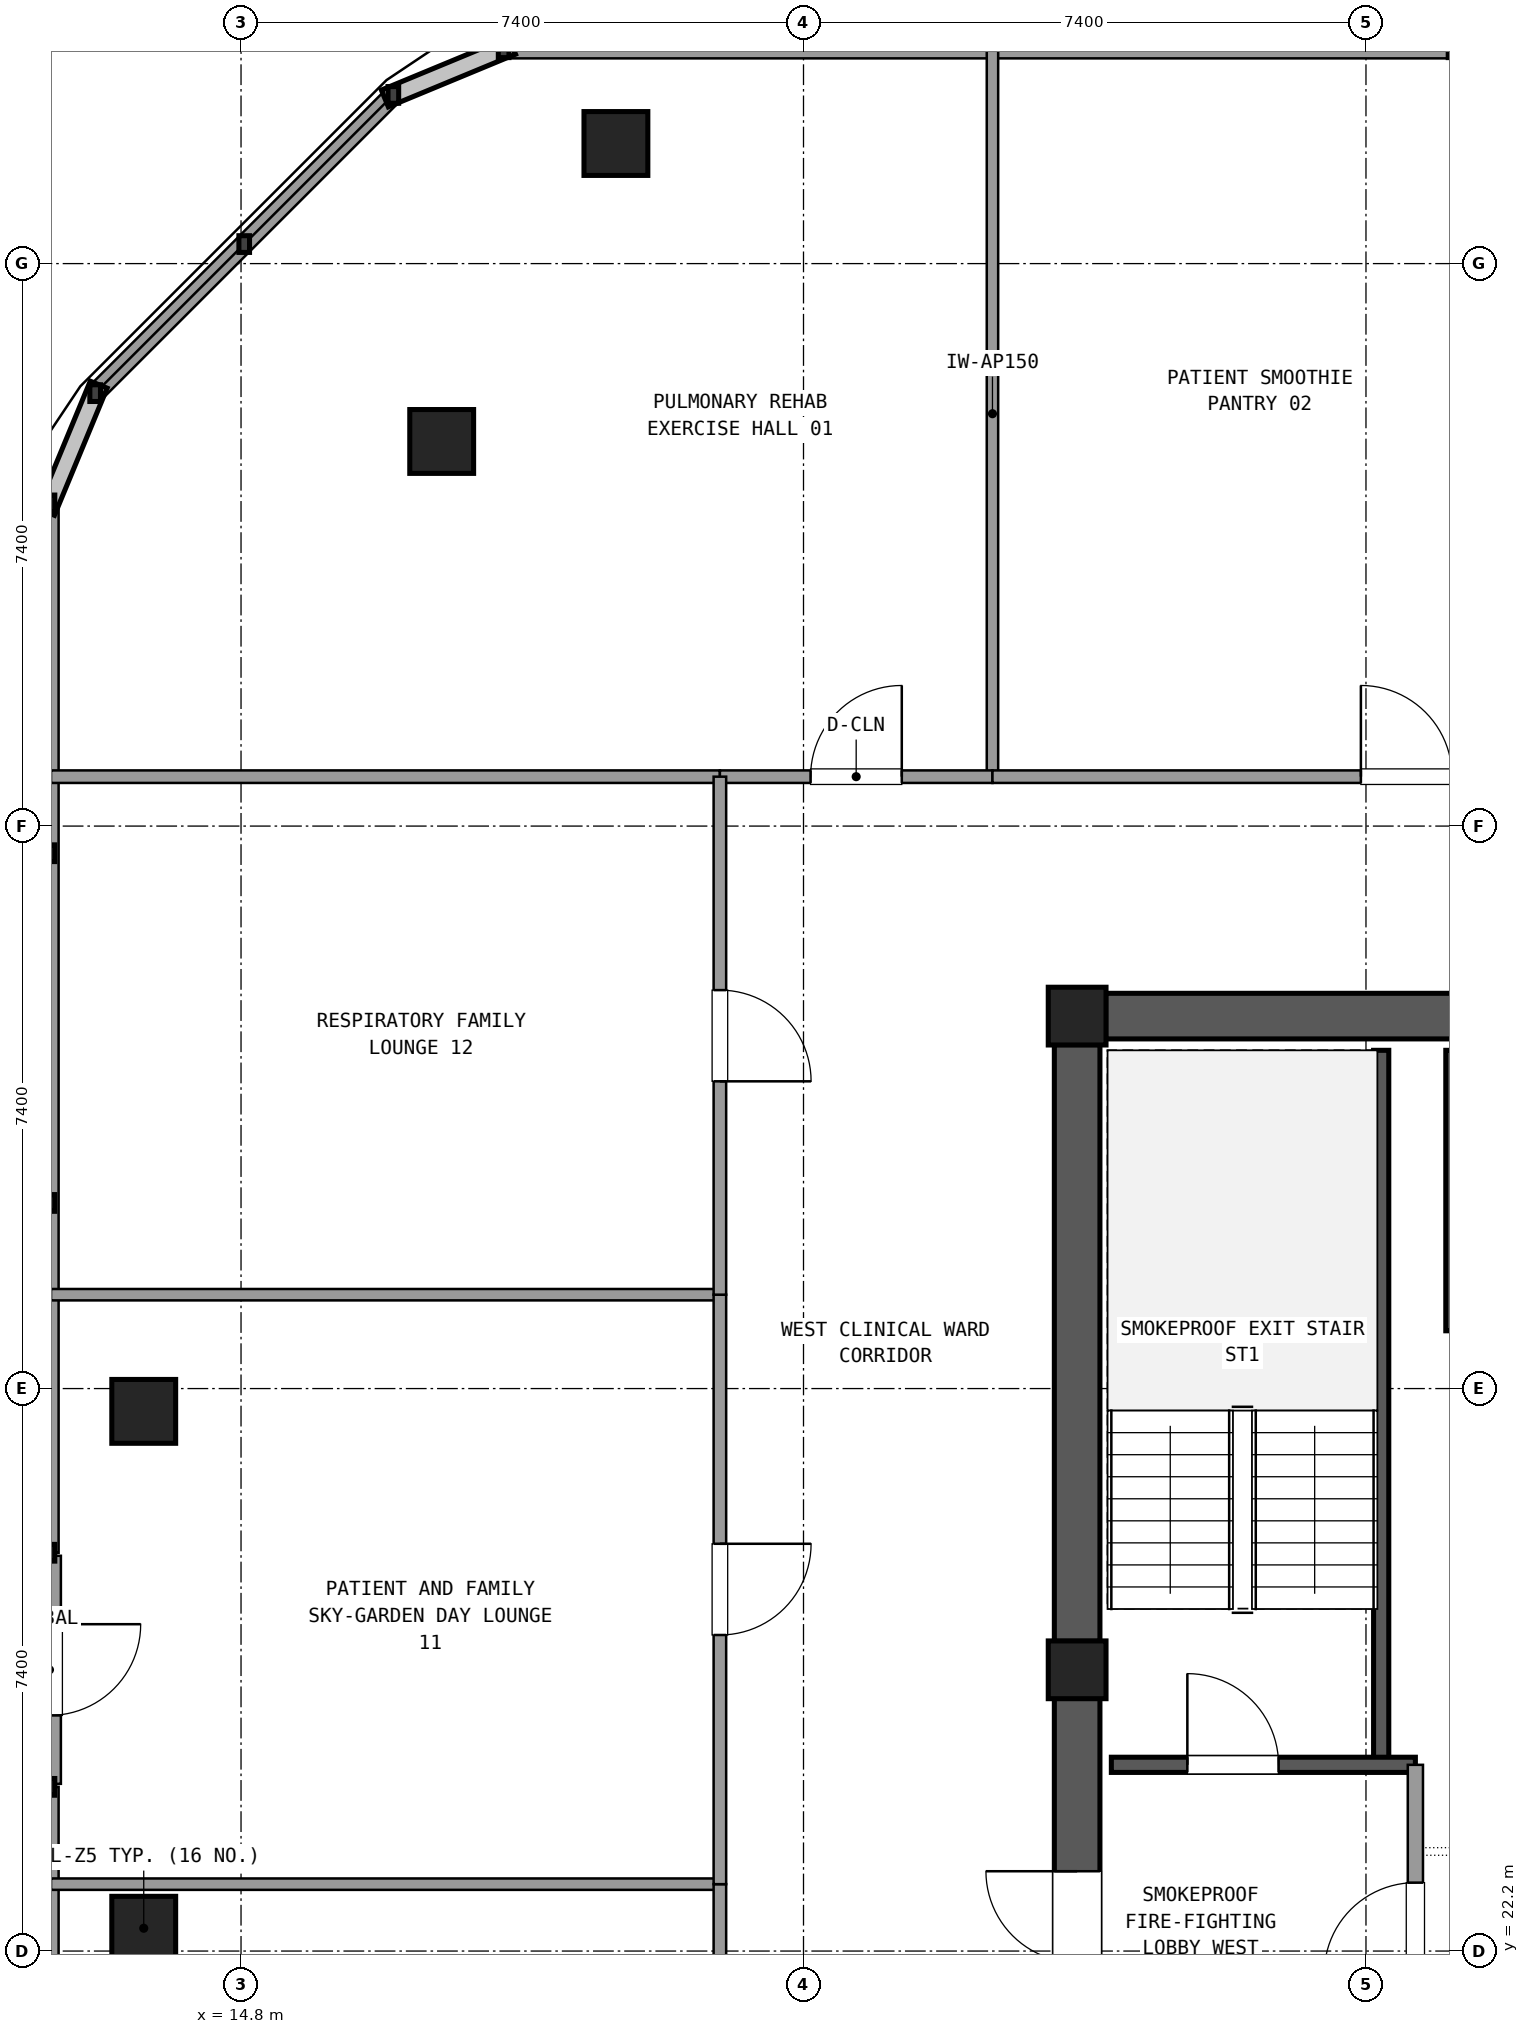
"""IFC4 building model, lengths in metres.
Left out: names, types, materials, properties, quantities, classifications, styles, units other than length and angle.
Written with IfcOpenShell. Run it as: python <this file> out.ifc"""

import sys

from ifc_helpers import new_model, si_unit, direction, frame, frame_2d, origin, origin_2d, place, context, subcontext, project, spatial, rectangle, extrude, element, fill, save


model = new_model("IFC4")
c1 = context("Model", 3, precision=1e-05, world=origin(), true_north=direction((0.0, 1.0)))
c2 = subcontext(c1, "Body", "Model", "MODEL_VIEW")
j1 = project(units=[si_unit("LENGTHUNIT", "METRE"), si_unit("PLANEANGLEUNIT", "RADIAN")], contexts=[c1])
p1 = place(None, origin())
s1 = spatial("IfcSite", under=j1, at=p1, CompositionType="ELEMENT")
p2 = place(p1, origin())
s2 = spatial("IfcBuilding", under=s1, at=p2, CompositionType="ELEMENT")
p3 = place(p2, frame((0.0, 0.0, 271.62)))
s3 = spatial("IfcBuildingStorey", under=s2, at=p3, CompositionType="ELEMENT", Elevation=271.62)
for number, where, z_axis, x_axis in (
    (1, (25.8, 34.5, 0.0), (0.0, 0.0, 1.0), (1.0, 0.0, 0.0)),
    (2, (25.8, 25.9, 0.0), (0.0, 0.0, 1.0), (1.0, 0.0, 0.0)),
):
    element("IfcColumn", number, at=place(p3, frame(where, z_axis=z_axis, x_axis=x_axis)), inside=s3, PredefinedType="COLUMN", context=c2, shape_type="SweptSolid", body=[
        extrude(rectangle(XDim=0.76, YDim=0.76, at=origin_2d()), origin(), (0.0, 0.0, 1.0), 3.6),
    ])
p4 = place(p3, frame((36.625, 34.5, 0.0), z_axis=(0.0, 0.0, 1.0), x_axis=(-1.0, 0.0, 0.0)))
e3 = element("IfcWall", 3, at=p4, inside=s3, PredefinedType="SHEAR", context=c2, shape_type="SweptSolid", body=[
    extrude(rectangle(XDim=10.45, YDim=0.6, at=frame_2d((5.225, 0.0))), origin(), (0.0, 0.0, 1.0), 3.32),
])
p5 = place(p4, frame((4.225, 0.0, 0.0)))
e4 = element("IfcOpeningElement", 4, at=p5, cuts=e3, PredefinedType="OPENING", context=c2, shape_type="SweptSolid", body=[
    extrude(rectangle(XDim=1.2, YDim=2.15, at=frame_2d((0.6, 1.075))), frame((0.0, 0.31, 0.0), z_axis=(0.0, -1.0, 0.0), x_axis=(1.0, 0.0, 0.0)), (0.0, 0.0, 1.0), 0.62),
])
p6 = place(p3, frame((25.8, 34.125, 0.0), z_axis=(0.0, 0.0, 1.0), x_axis=(0.0, -1.0, 0.0)))
e5 = element("IfcWall", 5, at=p6, inside=s3, PredefinedType="SHEAR", context=c2, shape_type="SweptSolid", body=[
    extrude(rectangle(XDim=7.85, YDim=0.6, at=frame_2d((3.925, 0.0))), origin(), (0.0, 0.0, 1.0), 3.32),
])
p7 = place(p3, frame((25.8, 25.525, 0.0), z_axis=(0.0, 0.0, 1.0), x_axis=(0.0, -1.0, 0.0)))
e6 = element("IfcWall", 6, at=p7, inside=s3, PredefinedType="SHEAR", context=c2, shape_type="SweptSolid", body=[
    extrude(rectangle(XDim=7.85, YDim=0.6, at=frame_2d((3.925, 0.0))), origin(), (0.0, 0.0, 1.0), 3.32),
])
p8 = place(p7, frame((2.275, 0.0, 0.0)))
e7 = element("IfcOpeningElement", 7, at=p8, cuts=e6, PredefinedType="OPENING", context=c2, shape_type="SweptSolid", body=[
    extrude(rectangle(XDim=1.2, YDim=2.15, at=frame_2d((0.6, 1.075))), frame((0.0, 0.31, 0.0), z_axis=(0.0, -1.0, 0.0), x_axis=(1.0, 0.0, 0.0)), (0.0, 0.0, 1.0), 0.62),
])
for number, where, z_axis, x_axis in (
    (8, (13.52, 22.5, 0.0), (0.0, 0.0, 1.0), (1.0, 0.0, 0.0)),
    (9, (19.732, 45.98, 0.0), (0.0, 0.0, 1.0), (1.0, 0.0, 0.0)),
    (10, (17.44, 42.06, 0.0), (0.0, 0.0, 1.0), (1.0, 0.0, 0.0)),
    (11, (13.52, 29.3, 0.0), (0.0, 0.0, 1.0), (1.0, 0.0, 0.0)),
):
    element("IfcColumn", number, at=place(p3, frame(where, z_axis=z_axis, x_axis=x_axis)), inside=s3, PredefinedType="COLUMN", context=c2, shape_type="SweptSolid", body=[
        extrude(rectangle(XDim=0.84, YDim=0.84, at=origin_2d()), origin(), (0.0, 0.0, 1.0), 3.6),
    ])
p9 = place(p3, frame((55.745, 47.22, 0.0), z_axis=(0.0, 0.0, 1.0), x_axis=(-1.0, 0.0, 0.0)))
e12 = element("IfcWall", 12, at=p9, inside=s3, PredefinedType="SOLIDWALL", context=c2, shape_type="SweptSolid", body=[
    extrude(rectangle(XDim=37.49, YDim=0.24, at=frame_2d((18.745, 0.0))), origin(), (0.0, 0.0, 1.0), 0.85),
])
p10 = place(p3, frame((16.804, 46.619, 0.0), z_axis=(0.0, 0.0, 1.0), x_axis=(-0.707106781187, -0.707106781187, 0.0)))
e13 = element("IfcWall", 13, at=p10, inside=s3, PredefinedType="SOLIDWALL", context=c2, shape_type="SweptSolid", body=[
    extrude(rectangle(XDim=5.548, YDim=0.24, at=frame_2d((2.774, 0.0))), origin(), (0.0, 0.0, 1.0), 0.85),
])
p11 = place(p3, frame((12.28, 27.4, 0.0), z_axis=(0.0, 0.0, 1.0), x_axis=(0.0, -1.0, 0.0)))
e14 = element("IfcWall", 14, at=p11, inside=s3, PredefinedType="SOLIDWALL", context=c2, shape_type="SweptSolid", body=[
    extrude(rectangle(XDim=3.0, YDim=0.3, at=frame_2d((1.5, 0.0))), origin(), (0.0, 0.0, 1.0), 2.69),
])
p12 = place(p11, frame((0.9, 0.0, 0.0)))
e15 = element("IfcOpeningElement", 15, at=p12, cuts=e14, PredefinedType="OPENING", context=c2, shape_type="SweptSolid", body=[
    extrude(rectangle(XDim=1.2, YDim=2.2, at=frame_2d((0.6, 1.1))), frame((0.0, 0.16, 0.0), z_axis=(0.0, -1.0, 0.0), x_axis=(1.0, 0.0, 0.0)), (0.0, 0.0, 1.0), 0.32),
])
for number, where, z_axis, x_axis in (
    (16, (12.28, 41.245, 0.0), (0.0, 0.0, 1.0), (0.0, -1.0, 0.0)),
    (17, (12.28, 24.36, 0.0), (0.0, 0.0, 1.0), (0.0, -1.0, 0.0)),
):
    element("IfcWall", number, at=place(p3, frame(where, z_axis=z_axis, x_axis=x_axis)), inside=s3, PredefinedType="SOLIDWALL", context=c2, shape_type="SweptSolid", body=[
        extrude(rectangle(XDim=13.805, YDim=0.24, at=frame_2d((6.903, 0.0))), origin(), (0.0, 0.0, 1.0), 0.85),
    ])
p13 = place(p3, frame((29.8, 24.65, 0.0), z_axis=(0.0, 0.0, 1.0), x_axis=(0.0, 1.0, 0.0)))
e18 = element("IfcWall", 18, at=p13, inside=s3, PredefinedType="SHEAR", context=c2, shape_type="SweptSolid", body=[
    extrude(rectangle(XDim=9.4, YDim=0.2, at=frame_2d((4.7, 0.0))), origin(), (0.0, 0.0, 1.0), 3.32),
])
p14 = place(p3, frame((26.25, 24.65, 0.0), z_axis=(0.0, 0.0, 1.0), x_axis=(1.0, 0.0, 0.0)))
e19 = element("IfcWall", 19, at=p14, inside=s3, PredefinedType="SHEAR", context=c2, shape_type="SweptSolid", body=[
    extrude(rectangle(XDim=4.0, YDim=0.2, at=frame_2d((2.0, 0.0))), origin(), (0.0, 0.0, 1.0), 3.32),
])
p15 = place(p14, frame((1.0, 0.0, 0.0)))
e20 = element("IfcOpeningElement", 20, at=p15, cuts=e19, PredefinedType="OPENING", context=c2, shape_type="SweptSolid", body=[
    extrude(rectangle(XDim=1.2, YDim=2.15, at=frame_2d((0.6, 1.075))), frame((0.0, 0.11, 0.0), z_axis=(0.0, -1.0, 0.0), x_axis=(1.0, 0.0, 0.0)), (0.0, 0.0, 1.0), 0.22),
])
p16 = place(p3, frame((30.75, 30.36, 0.0), z_axis=(0.0, 0.0, 1.0), x_axis=(0.0, 1.0, 0.0)))
e21 = element("IfcWall", 21, at=p16, inside=s3, PredefinedType="SHEAR", context=c2, shape_type="SweptSolid", body=[
    extrude(rectangle(XDim=3.69, YDim=0.2, at=frame_2d((1.845, 0.0))), origin(), (0.0, 0.0, 1.0), 3.32),
])
p17 = place(p3, frame((30.25, 17.75, 0.0), z_axis=(0.0, 0.0, 1.0), x_axis=(0.0, 1.0, 0.0)))
e22 = element("IfcWall", 22, at=p17, inside=s3, PredefinedType="SOLIDWALL", context=c2, shape_type="SweptSolid", body=[
    extrude(rectangle(XDim=6.9, YDim=0.2, at=frame_2d((3.45, 0.0))), origin(), (0.0, 0.0, 1.0), 2.61),
])
p18 = place(p17, frame((4.15, 0.0, 0.0)))
e23 = element("IfcOpeningElement", 23, at=p18, cuts=e22, PredefinedType="OPENING", context=c2, shape_type="SweptSolid", body=[
    extrude(rectangle(XDim=1.2, YDim=2.15, at=frame_2d((0.6, 1.075))), frame((0.0, 0.11, 0.0), z_axis=(0.0, -1.0, 0.0), x_axis=(1.0, 0.0, 0.0)), (0.0, 0.0, 1.0), 0.22),
])
p19 = place(p3, frame((12.3, 37.65, 0.0), z_axis=(0.0, 0.0, 1.0), x_axis=(1.0, 0.0, 0.0)))
e24 = element("IfcWall", 24, at=p19, inside=s3, PredefinedType="PARTITIONING", context=c2, shape_type="SweptSolid", body=[
    extrude(rectangle(XDim=8.8, YDim=0.165, at=frame_2d((4.4, 0.0))), origin(), (0.0, 0.0, 1.0), 2.61),
])
p20 = place(p3, frame((24.686, 37.65, 0.0), z_axis=(0.0, 0.0, 1.0), x_axis=(0.0, 1.0, 0.0)))
e25 = element("IfcWall", 25, at=p20, inside=s3, PredefinedType="PARTITIONING", context=c2, shape_type="SweptSolid", body=[
    extrude(rectangle(XDim=9.55, YDim=0.15, at=frame_2d((4.775, 0.0))), origin(), (0.0, 0.0, 1.0), 2.61),
])
p21 = place(p3, frame((21.1, 37.65, 0.0), z_axis=(0.0, 0.0, 1.0), x_axis=(1.0, 0.0, 0.0)))
e26 = element("IfcWall", 26, at=p21, inside=s3, PredefinedType="PARTITIONING", context=c2, shape_type="SweptSolid", body=[
    extrude(rectangle(XDim=3.586, YDim=0.165, at=frame_2d((1.793, 0.0))), origin(), (0.0, 0.0, 1.0), 2.61),
])
p22 = place(p21, frame((1.193, 0.0, 0.0)))
e27 = element("IfcOpeningElement", 27, at=p22, cuts=e26, PredefinedType="OPENING", context=c2, shape_type="SweptSolid", body=[
    extrude(rectangle(XDim=1.2, YDim=2.15, at=frame_2d((0.6, 1.075))), frame((0.0, 0.093, 0.0), z_axis=(0.0, -1.0, 0.0), x_axis=(1.0, 0.0, 0.0)), (0.0, 0.0, 1.0), 0.185),
])
p23 = place(p3, frame((24.686, 37.65, 0.0), z_axis=(0.0, 0.0, 1.0), x_axis=(1.0, 0.0, 0.0)))
e28 = element("IfcWall", 28, at=p23, inside=s3, PredefinedType="PARTITIONING", context=c2, shape_type="SweptSolid", body=[
    extrude(rectangle(XDim=10.893, YDim=0.165, at=frame_2d((5.447, 0.0))), origin(), (0.0, 0.0, 1.0), 2.61),
])
p24 = place(p23, frame((4.847, 0.0, 0.0)))
e29 = element("IfcOpeningElement", 29, at=p24, cuts=e28, PredefinedType="OPENING", context=c2, shape_type="SweptSolid", body=[
    extrude(rectangle(XDim=1.2, YDim=2.15, at=frame_2d((0.6, 1.075))), frame((0.0, 0.093, 0.0), z_axis=(0.0, -1.0, 0.0), x_axis=(1.0, 0.0, 0.0)), (0.0, 0.0, 1.0), 0.185),
])
p25 = place(p3, frame((21.1, 23.08, 0.0), z_axis=(0.0, 0.0, 1.0), x_axis=(-1.0, 0.0, 0.0)))
e30 = element("IfcWall", 30, at=p25, inside=s3, PredefinedType="PARTITIONING", context=c2, shape_type="SweptSolid", body=[
    extrude(rectangle(XDim=8.8, YDim=0.15, at=frame_2d((4.4, 0.0))), origin(), (0.0, 0.0, 1.0), 2.61),
])
p26 = place(p3, frame((21.1, 14.15, 0.0), z_axis=(0.0, 0.0, 1.0), x_axis=(0.0, 1.0, 0.0)))
e31 = element("IfcWall", 31, at=p26, inside=s3, PredefinedType="PARTITIONING", context=c2, shape_type="SweptSolid", body=[
    extrude(rectangle(XDim=8.93, YDim=0.165, at=frame_2d((4.465, 0.0))), origin(), (0.0, 0.0, 1.0), 2.61),
])
p27 = place(p26, frame((3.865, 0.0, 0.0)))
e32 = element("IfcOpeningElement", 32, at=p27, cuts=e31, PredefinedType="OPENING", context=c2, shape_type="SweptSolid", body=[
    extrude(rectangle(XDim=1.2, YDim=2.15, at=frame_2d((0.6, 1.075))), frame((0.0, 0.093, 0.0), z_axis=(0.0, -1.0, 0.0), x_axis=(1.0, 0.0, 0.0)), (0.0, 0.0, 1.0), 0.185),
])
p28 = place(p3, frame((21.1, 30.835, 0.0), z_axis=(0.0, 0.0, 1.0), x_axis=(-1.0, 0.0, 0.0)))
e33 = element("IfcWall", 33, at=p28, inside=s3, PredefinedType="PARTITIONING", context=c2, shape_type="SweptSolid", body=[
    extrude(rectangle(XDim=8.8, YDim=0.15, at=frame_2d((4.4, 0.0))), origin(), (0.0, 0.0, 1.0), 2.61),
])
p29 = place(p3, frame((21.1, 23.08, 0.0), z_axis=(0.0, 0.0, 1.0), x_axis=(0.0, 1.0, 0.0)))
e34 = element("IfcWall", 34, at=p29, inside=s3, PredefinedType="PARTITIONING", context=c2, shape_type="SweptSolid", body=[
    extrude(rectangle(XDim=7.755, YDim=0.165, at=frame_2d((3.877, 0.0))), origin(), (0.0, 0.0, 1.0), 2.61),
])
p30 = place(p29, frame((3.278, 0.0, 0.0)))
e35 = element("IfcOpeningElement", 35, at=p30, cuts=e34, PredefinedType="OPENING", context=c2, shape_type="SweptSolid", body=[
    extrude(rectangle(XDim=1.2, YDim=2.15, at=frame_2d((0.6, 1.075))), frame((0.0, 0.093, 0.0), z_axis=(0.0, -1.0, 0.0), x_axis=(1.0, 0.0, 0.0)), (0.0, 0.0, 1.0), 0.185),
])
p31 = place(p3, frame((21.1, 30.835, 0.0), z_axis=(0.0, 0.0, 1.0), x_axis=(0.0, 1.0, 0.0)))
e36 = element("IfcWall", 36, at=p31, inside=s3, PredefinedType="PARTITIONING", context=c2, shape_type="SweptSolid", body=[
    extrude(rectangle(XDim=6.815, YDim=0.165, at=frame_2d((3.407, 0.0))), origin(), (0.0, 0.0, 1.0), 2.61),
])
p32 = place(p31, frame((2.807, 0.0, 0.0)))
e37 = element("IfcOpeningElement", 37, at=p32, cuts=e36, PredefinedType="OPENING", context=c2, shape_type="SweptSolid", body=[
    extrude(rectangle(XDim=1.2, YDim=2.15, at=frame_2d((0.6, 1.075))), frame((0.0, 0.093, 0.0), z_axis=(0.0, -1.0, 0.0), x_axis=(1.0, 0.0, 0.0)), (0.0, 0.0, 1.0), 0.185),
])
p33 = place(p15, origin())
e38 = element("IfcDoor", 38, at=p33, inside=s3, OperationType="SINGLE_SWING_LEFT", PredefinedType="DOOR", context=c2, shape_type="SweptSolid", body=[
    extrude(rectangle(XDim=1.2, YDim=2.15, at=frame_2d((0.6, 1.075))), frame((0.0, 0.025, 0.0), z_axis=(0.0, -1.0, 0.0), x_axis=(1.0, 0.0, 0.0)), (0.0, 0.0, 1.0), 0.05),
])
fill(e20, e38)
p34 = place(p18, origin())
e39 = element("IfcDoor", 39, at=p34, inside=s3, OperationType="SINGLE_SWING_LEFT", PredefinedType="DOOR", context=c2, shape_type="SweptSolid", body=[
    extrude(rectangle(XDim=1.2, YDim=2.15, at=frame_2d((0.6, 1.075))), frame((0.0, 0.025, 0.0), z_axis=(0.0, -1.0, 0.0), x_axis=(1.0, 0.0, 0.0)), (0.0, 0.0, 1.0), 0.05),
])
fill(e23, e39)
p35 = place(p8, frame((1.2, 0.0, 0.0), z_axis=(0.0, 0.0, 1.0), x_axis=(-1.0, 0.0, 0.0)))
e40 = element("IfcDoor", 40, at=p35, inside=s3, OperationType="SINGLE_SWING_LEFT", PredefinedType="DOOR", context=c2, shape_type="SweptSolid", body=[
    extrude(rectangle(XDim=1.2, YDim=2.15, at=frame_2d((0.6, 1.075))), frame((0.0, 0.025, 0.0), z_axis=(0.0, -1.0, 0.0), x_axis=(1.0, 0.0, 0.0)), (0.0, 0.0, 1.0), 0.05),
])
fill(e7, e40)
p36 = place(p22, origin())
e41 = element("IfcDoor", 41, at=p36, inside=s3, OperationType="SINGLE_SWING_RIGHT", PredefinedType="DOOR", context=c2, shape_type="SweptSolid", body=[
    extrude(rectangle(XDim=1.2, YDim=2.15, at=frame_2d((0.6, 1.075))), frame((0.0, 0.025, 0.0), z_axis=(0.0, -1.0, 0.0), x_axis=(1.0, 0.0, 0.0)), (0.0, 0.0, 1.0), 0.05),
])
fill(e27, e41)
p37 = place(p24, origin())
e42 = element("IfcDoor", 42, at=p37, inside=s3, OperationType="SINGLE_SWING_LEFT", PredefinedType="DOOR", context=c2, shape_type="SweptSolid", body=[
    extrude(rectangle(XDim=1.2, YDim=2.15, at=frame_2d((0.6, 1.075))), frame((0.0, 0.025, 0.0), z_axis=(0.0, -1.0, 0.0), x_axis=(1.0, 0.0, 0.0)), (0.0, 0.0, 1.0), 0.05),
])
fill(e29, e42)
p38 = place(p30, frame((1.2, 0.0, 0.0), z_axis=(0.0, 0.0, 1.0), x_axis=(-1.0, 0.0, 0.0)))
e43 = element("IfcDoor", 43, at=p38, inside=s3, OperationType="SINGLE_SWING_RIGHT", PredefinedType="DOOR", context=c2, shape_type="SweptSolid", body=[
    extrude(rectangle(XDim=1.2, YDim=2.15, at=frame_2d((0.6, 1.075))), frame((0.0, 0.025, 0.0), z_axis=(0.0, -1.0, 0.0), x_axis=(1.0, 0.0, 0.0)), (0.0, 0.0, 1.0), 0.05),
])
fill(e35, e43)
p39 = place(p32, frame((1.2, 0.0, 0.0), z_axis=(0.0, 0.0, 1.0), x_axis=(-1.0, 0.0, 0.0)))
e44 = element("IfcDoor", 44, at=p39, inside=s3, OperationType="SINGLE_SWING_LEFT", PredefinedType="DOOR", context=c2, shape_type="SweptSolid", body=[
    extrude(rectangle(XDim=1.2, YDim=2.15, at=frame_2d((0.6, 1.075))), frame((0.0, 0.025, 0.0), z_axis=(0.0, -1.0, 0.0), x_axis=(1.0, 0.0, 0.0)), (0.0, 0.0, 1.0), 0.05),
])
fill(e37, e44)
save(model, sys.argv[1])
